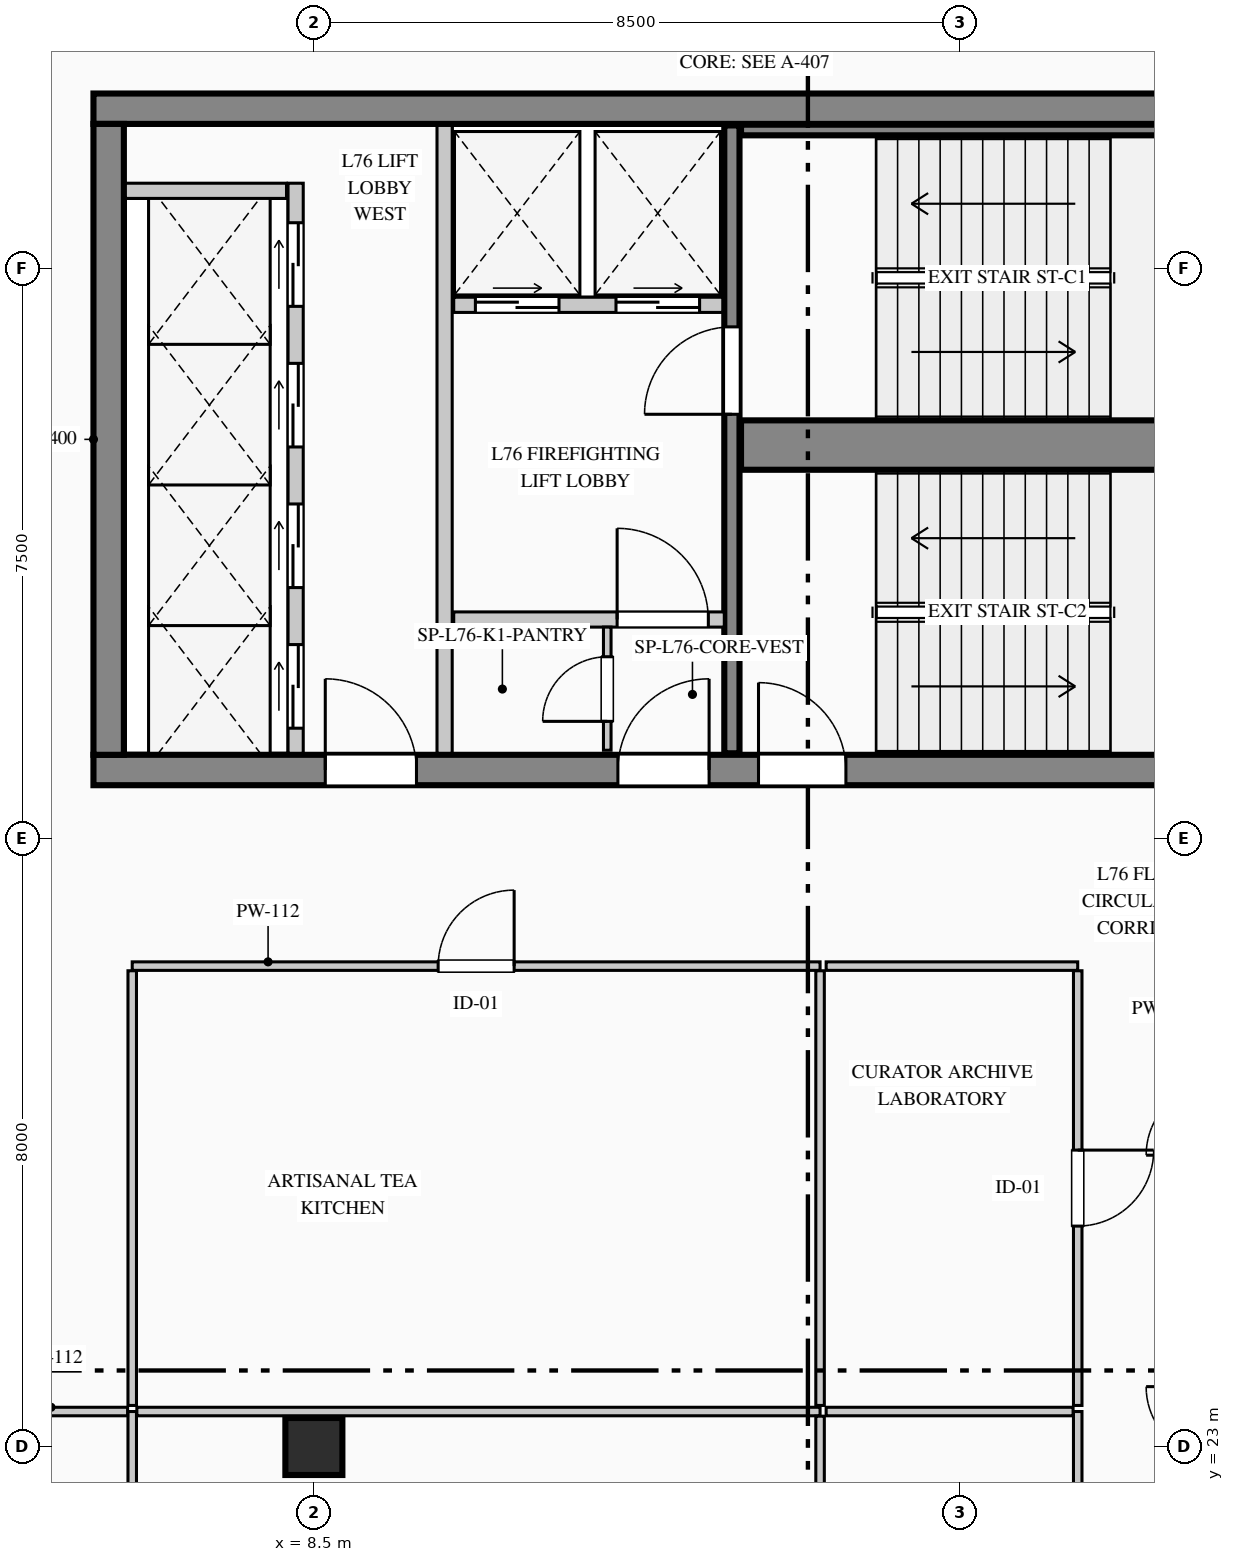
"""IFC4 building model, lengths in metres.
Left out: names, types, materials, properties, quantities, classifications, styles, units other than length and angle.
Written with IfcOpenShell. Run it as: python <this file> out.ifc"""

import sys

from ifc_helpers import new_model, si_unit, direction, frame, frame_2d, origin, origin_2d, place, context, subcontext, project, spatial, rectangle, extrude, element, fill, save


model = new_model("IFC4")
c1 = context("Model", 3, precision=1e-05, world=origin(), true_north=direction((0.0, 1.0)))
c2 = subcontext(c1, "Body", "Model", "MODEL_VIEW")
j1 = project(units=[si_unit("LENGTHUNIT", "METRE"), si_unit("PLANEANGLEUNIT", "RADIAN")], contexts=[c1])
p1 = place(None, origin())
s1 = spatial("IfcSite", under=j1, at=p1, CompositionType="ELEMENT")
p2 = place(p1, origin())
s2 = spatial("IfcBuilding", under=s1, at=p2, CompositionType="ELEMENT")
p3 = place(p2, frame((0.0, 0.0, 315.95)))
s3 = spatial("IfcBuildingStorey", under=s2, at=p3, CompositionType="ELEMENT", Elevation=315.95)
p4 = place(p3, frame((5.6, 40.6, 0.0), z_axis=(0.0, 0.0, 1.0), x_axis=(1.0, 0.0, 0.0)))
e1 = element("IfcWall", 1, at=p4, inside=s3, PredefinedType="SHEAR", context=c2, shape_type="SweptSolid", body=[
    extrude(rectangle(XDim=17.65, YDim=0.4, at=frame_2d((8.825, 0.0))), origin(), (0.0, 0.0, 1.0), 3.95),
])
p5 = place(p4, frame((15.845, 0.0, 0.0)))
e2 = element("IfcOpeningElement", 2, at=p5, cuts=e1, PredefinedType="OPENING", context=c2, shape_type="SweptSolid", body=[
    extrude(rectangle(XDim=1.18, YDim=2.25, at=frame_2d((0.59, 1.125))), frame((0.0, 0.21, 0.0), z_axis=(0.0, -1.0, 0.0), x_axis=(1.0, 0.0, 0.0)), (0.0, 0.0, 1.0), 0.42),
])
p6 = place(p3, frame((5.6, 31.9, 0.0), z_axis=(0.0, 0.0, 1.0), x_axis=(1.0, 0.0, 0.0)))
e3 = element("IfcWall", 3, at=p6, inside=s3, PredefinedType="SHEAR", context=c2, shape_type="SweptSolid", body=[
    extrude(rectangle(XDim=17.65, YDim=0.4, at=frame_2d((8.825, 0.0))), origin(), (0.0, 0.0, 1.0), 3.95),
])
p7 = place(p6, frame((3.05, 0.0, 0.0)))
e4 = element("IfcOpeningElement", 4, at=p7, cuts=e3, PredefinedType="OPENING", context=c2, shape_type="SweptSolid", body=[
    extrude(rectangle(XDim=1.2, YDim=2.2, at=frame_2d((0.6, 1.1))), frame((0.0, 0.21, 0.0), z_axis=(0.0, -1.0, 0.0), x_axis=(1.0, 0.0, 0.0)), (0.0, 0.0, 1.0), 0.42),
])
p8 = place(p6, frame((6.9, 0.0, 0.0)))
e5 = element("IfcOpeningElement", 5, at=p8, cuts=e3, PredefinedType="OPENING", context=c2, shape_type="SweptSolid", body=[
    extrude(rectangle(XDim=1.2, YDim=2.2, at=frame_2d((0.6, 1.1))), frame((0.0, 0.21, 0.0), z_axis=(0.0, -1.0, 0.0), x_axis=(1.0, 0.0, 0.0)), (0.0, 0.0, 1.0), 0.42),
])
p9 = place(p6, frame((8.75, 0.0, 0.0)))
e6 = element("IfcOpeningElement", 6, at=p9, cuts=e3, PredefinedType="OPENING", context=c2, shape_type="SweptSolid", body=[
    extrude(rectangle(XDim=1.15, YDim=2.2, at=frame_2d((0.575, 1.1))), frame((0.0, 0.21, 0.0), z_axis=(0.0, -1.0, 0.0), x_axis=(1.0, 0.0, 0.0)), (0.0, 0.0, 1.0), 0.42),
])
p10 = place(p6, frame((15.85, 0.0, 0.0)))
e7 = element("IfcOpeningElement", 7, at=p10, cuts=e3, PredefinedType="OPENING", context=c2, shape_type="SweptSolid", body=[
    extrude(rectangle(XDim=1.2, YDim=2.2, at=frame_2d((0.6, 1.1))), frame((0.0, 0.21, 0.0), z_axis=(0.0, -1.0, 0.0), x_axis=(1.0, 0.0, 0.0)), (0.0, 0.0, 1.0), 0.42),
])
p11 = place(p3, frame((5.8, 32.1, 0.0), z_axis=(0.0, 0.0, 1.0), x_axis=(0.0, 1.0, 0.0)))
e8 = element("IfcWall", 8, at=p11, inside=s3, PredefinedType="SHEAR", context=c2, shape_type="SweptSolid", body=[
    extrude(rectangle(XDim=8.3, YDim=0.4, at=frame_2d((4.15, 0.0))), origin(), (0.0, 0.0, 1.0), 3.95),
])
p12 = place(p3, frame((14.0, 32.12, 0.0), z_axis=(0.0, 0.0, 1.0), x_axis=(0.0, 1.0, 0.0)))
e9 = element("IfcWall", 9, at=p12, inside=s3, PredefinedType="SHEAR", context=c2, shape_type="SweptSolid", body=[
    extrude(rectangle(XDim=8.26, YDim=0.2, at=frame_2d((4.13, 0.0))), origin(), (0.0, 0.0, 1.0), 3.95),
])
p13 = place(p12, frame((4.46, 0.0, 0.0)))
e10 = element("IfcOpeningElement", 10, at=p13, cuts=e9, PredefinedType="OPENING", context=c2, shape_type="SweptSolid", body=[
    extrude(rectangle(XDim=1.15, YDim=2.2, at=frame_2d((0.575, 1.1))), frame((0.0, 0.11, 0.0), z_axis=(0.0, -1.0, 0.0), x_axis=(1.0, 0.0, 0.0)), (0.0, 0.0, 1.0), 0.22),
])
p14 = place(p3, frame((14.12, 36.175, 0.0), z_axis=(0.0, 0.0, 1.0), x_axis=(1.0, 0.0, 0.0)))
e11 = element("IfcWall", 11, at=p14, inside=s3, PredefinedType="SHEAR", context=c2, shape_type="SweptSolid", body=[
    extrude(rectangle(XDim=7.01, YDim=0.65, at=frame_2d((3.505, 0.0))), origin(), (0.0, 0.0, 1.0), 3.95),
])
p15 = place(p3, frame((14.12, 40.32, 0.0), z_axis=(0.0, 0.0, 1.0), x_axis=(1.0, 0.0, 0.0)))
e12 = element("IfcWall", 12, at=p15, inside=s3, PredefinedType="SHEAR", context=c2, shape_type="SweptSolid", body=[
    extrude(rectangle(XDim=7.01, YDim=0.14, at=frame_2d((3.505, 0.0))), origin(), (0.0, 0.0, 1.0), 3.95),
])
p16 = place(p3, frame((8.5, 23.0, 0.0), z_axis=(0.0, 0.0, 1.0), x_axis=(1.0, 0.0, 0.0)))
e13 = element("IfcColumn", 13, at=p16, inside=s3, PredefinedType="COLUMN", context=c2, shape_type="SweptSolid", body=[
    extrude(rectangle(XDim=0.75, YDim=0.75, at=origin_2d()), origin(), (0.0, 0.0, 1.0), 3.95),
])
p17 = place(p3, frame((8.26, 32.12, 0.0), z_axis=(0.0, 0.0, 1.0), x_axis=(0.0, 1.0, 0.0)))
e14 = element("IfcWall", 14, at=p17, inside=s3, PredefinedType="PARTITIONING", context=c2, shape_type="SweptSolid", body=[
    extrude(rectangle(XDim=7.5, YDim=0.2, at=frame_2d((3.75, 0.0))), origin(), (0.0, 0.0, 1.0), 3.7),
])
p18 = place(p17, frame((0.33, 0.0, 0.0)))
e15 = element("IfcOpeningElement", 15, at=p18, cuts=e14, PredefinedType="OPENING", context=c2, shape_type="SweptSolid", body=[
    extrude(rectangle(XDim=1.1, YDim=2.2, at=frame_2d((0.55, 1.1))), frame((0.0, 0.11, 0.0), z_axis=(0.0, -1.0, 0.0), x_axis=(1.0, 0.0, 0.0)), (0.0, 0.0, 1.0), 0.22),
])
p19 = place(p17, frame((2.18, 0.0, 0.0)))
e16 = element("IfcOpeningElement", 16, at=p19, cuts=e14, PredefinedType="OPENING", context=c2, shape_type="SweptSolid", body=[
    extrude(rectangle(XDim=1.1, YDim=2.2, at=frame_2d((0.55, 1.1))), frame((0.0, 0.11, 0.0), z_axis=(0.0, -1.0, 0.0), x_axis=(1.0, 0.0, 0.0)), (0.0, 0.0, 1.0), 0.22),
])
p20 = place(p17, frame((4.03, 0.0, 0.0)))
e17 = element("IfcOpeningElement", 17, at=p20, cuts=e14, PredefinedType="OPENING", context=c2, shape_type="SweptSolid", body=[
    extrude(rectangle(XDim=1.1, YDim=2.2, at=frame_2d((0.55, 1.1))), frame((0.0, 0.11, 0.0), z_axis=(0.0, -1.0, 0.0), x_axis=(1.0, 0.0, 0.0)), (0.0, 0.0, 1.0), 0.22),
])
p21 = place(p17, frame((5.88, 0.0, 0.0)))
e18 = element("IfcOpeningElement", 18, at=p21, cuts=e14, PredefinedType="OPENING", context=c2, shape_type="SweptSolid", body=[
    extrude(rectangle(XDim=1.1, YDim=2.2, at=frame_2d((0.55, 1.1))), frame((0.0, 0.11, 0.0), z_axis=(0.0, -1.0, 0.0), x_axis=(1.0, 0.0, 0.0)), (0.0, 0.0, 1.0), 0.22),
])
p22 = place(p3, frame((6.02, 39.52, 0.0), z_axis=(0.0, 0.0, 1.0), x_axis=(1.0, 0.0, 0.0)))
e19 = element("IfcWall", 19, at=p22, inside=s3, PredefinedType="PARTITIONING", context=c2, shape_type="SweptSolid", body=[
    extrude(rectangle(XDim=2.12, YDim=0.2, at=frame_2d((1.06, 0.0))), origin(), (0.0, 0.0, 1.0), 3.7),
])
p23 = place(p3, frame((10.22, 32.12, 0.0), z_axis=(0.0, 0.0, 1.0), x_axis=(0.0, 1.0, 0.0)))
e20 = element("IfcWall", 20, at=p23, inside=s3, PredefinedType="PARTITIONING", context=c2, shape_type="SweptSolid", body=[
    extrude(rectangle(XDim=8.26, YDim=0.2, at=frame_2d((4.13, 0.0))), origin(), (0.0, 0.0, 1.0), 3.7),
])
p24 = place(p3, frame((10.34, 38.02, 0.0), z_axis=(0.0, 0.0, 1.0), x_axis=(1.0, 0.0, 0.0)))
e21 = element("IfcWall", 21, at=p24, inside=s3, PredefinedType="PARTITIONING", context=c2, shape_type="SweptSolid", body=[
    extrude(rectangle(XDim=3.54, YDim=0.2, at=frame_2d((1.77, 0.0))), origin(), (0.0, 0.0, 1.0), 3.7),
])
p25 = place(p24, frame((0.285, 0.0, 0.0)))
e22 = element("IfcOpeningElement", 22, at=p25, cuts=e21, PredefinedType="OPENING", context=c2, shape_type="SweptSolid", body=[
    extrude(rectangle(XDim=1.1, YDim=2.2, at=frame_2d((0.55, 1.1))), frame((0.0, 0.11, 0.0), z_axis=(0.0, -1.0, 0.0), x_axis=(1.0, 0.0, 0.0)), (0.0, 0.0, 1.0), 0.22),
])
p26 = place(p24, frame((2.135, 0.0, 0.0)))
e23 = element("IfcOpeningElement", 23, at=p26, cuts=e21, PredefinedType="OPENING", context=c2, shape_type="SweptSolid", body=[
    extrude(rectangle(XDim=1.1, YDim=2.2, at=frame_2d((0.55, 1.1))), frame((0.0, 0.11, 0.0), z_axis=(0.0, -1.0, 0.0), x_axis=(1.0, 0.0, 0.0)), (0.0, 0.0, 1.0), 0.22),
])
p27 = place(p3, frame((10.34, 33.88, 0.0), z_axis=(0.0, 0.0, 1.0), x_axis=(1.0, 0.0, 0.0)))
e24 = element("IfcWall", 24, at=p27, inside=s3, PredefinedType="PARTITIONING", context=c2, shape_type="SweptSolid", body=[
    extrude(rectangle(XDim=3.56, YDim=0.2, at=frame_2d((1.78, 0.0))), origin(), (0.0, 0.0, 1.0), 3.7),
])
p28 = place(p27, frame((2.15, 0.0, 0.0)))
e25 = element("IfcOpeningElement", 25, at=p28, cuts=e24, PredefinedType="OPENING", context=c2, shape_type="SweptSolid", body=[
    extrude(rectangle(XDim=1.2, YDim=2.2, at=frame_2d((0.6, 1.1))), frame((0.0, 0.11, 0.0), z_axis=(0.0, -1.0, 0.0), x_axis=(1.0, 0.0, 0.0)), (0.0, 0.0, 1.0), 0.22),
])
p29 = place(p3, frame((12.36, 32.16, 0.0), z_axis=(0.0, 0.0, 1.0), x_axis=(0.0, 1.0, 0.0)))
e26 = element("IfcWall", 26, at=p29, inside=s3, PredefinedType="PARTITIONING", context=c2, shape_type="SweptSolid", body=[
    extrude(rectangle(XDim=1.62, YDim=0.1, at=frame_2d((0.81, 0.0))), origin(), (0.0, 0.0, 1.0), 3.7),
])
p30 = place(p29, frame((0.38, 0.0, 0.0)))
e27 = element("IfcOpeningElement", 27, at=p30, cuts=e26, PredefinedType="OPENING", context=c2, shape_type="SweptSolid", body=[
    extrude(rectangle(XDim=0.85, YDim=2.1, at=frame_2d((0.425, 1.05))), frame((0.0, 0.06, 0.0), z_axis=(0.0, -1.0, 0.0), x_axis=(1.0, 0.0, 0.0)), (0.0, 0.0, 1.0), 0.12),
])
p31 = place(p3, frame((6.11, 18.941, 0.0), z_axis=(0.0, 0.0, 1.0), x_axis=(0.0, 1.0, 0.0)))
e28 = element("IfcWall", 28, at=p31, inside=s3, PredefinedType="PARTITIONING", context=c2, shape_type="SweptSolid", body=[
    extrude(rectangle(XDim=4.519, YDim=0.112, at=frame_2d((2.26, 0.0))), origin(), (0.0, 0.0, 1.0), 3.7),
])
p32 = place(p3, frame((4.034, 23.46, 0.0), z_axis=(0.0, 0.0, 1.0), x_axis=(1.0, 0.0, 0.0)))
e29 = element("IfcWall", 29, at=p32, inside=s3, PredefinedType="PARTITIONING", context=c2, shape_type="SweptSolid", body=[
    extrude(rectangle(XDim=2.015, YDim=0.112, at=frame_2d((1.007, 0.0))), origin(), (0.0, 0.0, 1.0), 3.7),
])
p33 = place(p3, frame((6.171, 23.46, 0.0), z_axis=(0.0, 0.0, 1.0), x_axis=(1.0, 0.0, 0.0)))
e30 = element("IfcWall", 30, at=p33, inside=s3, PredefinedType="PARTITIONING", context=c2, shape_type="SweptSolid", body=[
    extrude(rectangle(XDim=8.989, YDim=0.112, at=frame_2d((4.495, 0.0))), origin(), (0.0, 0.0, 1.0), 3.7),
])
p34 = place(p3, frame((15.16, 23.399, 0.0), z_axis=(0.0, 0.0, 1.0), x_axis=(0.0, -1.0, 0.0)))
e31 = element("IfcWall", 31, at=p34, inside=s3, PredefinedType="PARTITIONING", context=c2, shape_type="SweptSolid", body=[
    extrude(rectangle(XDim=4.458, YDim=0.112, at=frame_2d((2.229, 0.0))), origin(), (0.0, 0.0, 1.0), 3.7),
])
p35 = place(p3, frame((18.55, 23.46, 0.0), z_axis=(0.0, 0.0, 1.0), x_axis=(0.0, -1.0, 0.0)))
e32 = element("IfcWall", 32, at=p35, inside=s3, PredefinedType="PARTITIONING", context=c2, shape_type="SweptSolid", body=[
    extrude(rectangle(XDim=4.58, YDim=0.112, at=frame_2d((2.29, 0.0))), origin(), (0.0, 0.0, 1.0), 3.7),
])
p36 = place(p35, frame((1.79, 0.0, 0.0)))
e33 = element("IfcOpeningElement", 33, at=p36, cuts=e32, PredefinedType="OPENING", context=c2, shape_type="SweptSolid", body=[
    extrude(rectangle(XDim=1.0, YDim=2.15, at=frame_2d((0.5, 1.075))), frame((0.0, 0.066, 0.0), z_axis=(0.0, -1.0, 0.0), x_axis=(1.0, 0.0, 0.0)), (0.0, 0.0, 1.0), 0.132),
])
p37 = place(p3, frame((15.24, 23.46, 0.0), z_axis=(0.0, 0.0, 1.0), x_axis=(1.0, 0.0, 0.0)))
e34 = element("IfcWall", 34, at=p37, inside=s3, PredefinedType="PARTITIONING", context=c2, shape_type="SweptSolid", body=[
    extrude(rectangle(XDim=3.249, YDim=0.112, at=frame_2d((1.625, 0.0))), origin(), (0.0, 0.0, 1.0), 3.7),
])
p38 = place(p3, frame((6.11, 29.32, 0.0), z_axis=(0.0, 0.0, 1.0), x_axis=(1.0, 0.0, 0.0)))
e35 = element("IfcWall", 35, at=p38, inside=s3, PredefinedType="PARTITIONING", context=c2, shape_type="SweptSolid", body=[
    extrude(rectangle(XDim=9.05, YDim=0.112, at=frame_2d((4.525, 0.0))), origin(), (0.0, 0.0, 1.0), 3.7),
])
p39 = place(p38, frame((4.025, 0.0, 0.0)))
e36 = element("IfcOpeningElement", 36, at=p39, cuts=e35, PredefinedType="OPENING", context=c2, shape_type="SweptSolid", body=[
    extrude(rectangle(XDim=1.0, YDim=2.15, at=frame_2d((0.5, 1.075))), frame((0.0, 0.066, 0.0), z_axis=(0.0, -1.0, 0.0), x_axis=(1.0, 0.0, 0.0)), (0.0, 0.0, 1.0), 0.132),
])
for number, where, z_axis, x_axis in (
    (37, (15.16, 29.259, 0.0), (0.0, 0.0, 1.0), (0.0, -1.0, 0.0)),
    (38, (6.11, 23.54, 0.0), (0.0, 0.0, 1.0), (0.0, 1.0, 0.0)),
):
    element("IfcWall", number, at=place(p3, frame(where, z_axis=z_axis, x_axis=x_axis)), inside=s3, PredefinedType="PARTITIONING", context=c2, shape_type="SweptSolid", body=[
        extrude(rectangle(XDim=5.719, YDim=0.112, at=frame_2d((2.859, 0.0))), origin(), (0.0, 0.0, 1.0), 3.7),
    ])
p40 = place(p3, frame((15.24, 29.32, 0.0), z_axis=(0.0, 0.0, 1.0), x_axis=(1.0, 0.0, 0.0)))
e39 = element("IfcWall", 39, at=p40, inside=s3, PredefinedType="PARTITIONING", context=c2, shape_type="SweptSolid", body=[
    extrude(rectangle(XDim=3.31, YDim=0.112, at=frame_2d((1.655, 0.0))), origin(), (0.0, 0.0, 1.0), 3.7),
])
p41 = place(p3, frame((18.55, 29.259, 0.0), z_axis=(0.0, 0.0, 1.0), x_axis=(0.0, -1.0, 0.0)))
e40 = element("IfcWall", 40, at=p41, inside=s3, PredefinedType="PARTITIONING", context=c2, shape_type="SweptSolid", body=[
    extrude(rectangle(XDim=5.719, YDim=0.112, at=frame_2d((2.859, 0.0))), origin(), (0.0, 0.0, 1.0), 3.7),
])
p42 = place(p41, frame((2.36, 0.0, 0.0)))
e41 = element("IfcOpeningElement", 41, at=p42, cuts=e40, PredefinedType="OPENING", context=c2, shape_type="SweptSolid", body=[
    extrude(rectangle(XDim=1.0, YDim=2.15, at=frame_2d((0.5, 1.075))), frame((0.0, 0.066, 0.0), z_axis=(0.0, -1.0, 0.0), x_axis=(1.0, 0.0, 0.0)), (0.0, 0.0, 1.0), 0.132),
])
p43 = place(p7, origin())
e42 = element("IfcDoor", 42, at=p43, inside=s3, OperationType="SINGLE_SWING_LEFT", PredefinedType="DOOR", context=c2, shape_type="SweptSolid", body=[
    extrude(rectangle(XDim=1.2, YDim=2.2, at=frame_2d((0.6, 1.1))), frame((0.0, 0.025, 0.0), z_axis=(0.0, -1.0, 0.0), x_axis=(1.0, 0.0, 0.0)), (0.0, 0.0, 1.0), 0.05),
])
fill(e4, e42)
p44 = place(p8, origin())
e43 = element("IfcDoor", 43, at=p44, inside=s3, OperationType="SINGLE_SWING_RIGHT", PredefinedType="DOOR", context=c2, shape_type="SweptSolid", body=[
    extrude(rectangle(XDim=1.2, YDim=2.2, at=frame_2d((0.6, 1.1))), frame((0.0, 0.025, 0.0), z_axis=(0.0, -1.0, 0.0), x_axis=(1.0, 0.0, 0.0)), (0.0, 0.0, 1.0), 0.05),
])
fill(e5, e43)
p45 = place(p9, origin())
e44 = element("IfcDoor", 44, at=p45, inside=s3, OperationType="SINGLE_SWING_LEFT", PredefinedType="DOOR", context=c2, shape_type="SweptSolid", body=[
    extrude(rectangle(XDim=1.15, YDim=2.2, at=frame_2d((0.575, 1.1))), frame((0.0, 0.025, 0.0), z_axis=(0.0, -1.0, 0.0), x_axis=(1.0, 0.0, 0.0)), (0.0, 0.0, 1.0), 0.05),
])
fill(e6, e44)
p46 = place(p28, origin())
e45 = element("IfcDoor", 45, at=p46, inside=s3, OperationType="SINGLE_SWING_LEFT", PredefinedType="DOOR", context=c2, shape_type="SweptSolid", body=[
    extrude(rectangle(XDim=1.2, YDim=2.2, at=frame_2d((0.6, 1.1))), frame((0.0, 0.025, 0.0), z_axis=(0.0, -1.0, 0.0), x_axis=(1.0, 0.0, 0.0)), (0.0, 0.0, 1.0), 0.05),
])
fill(e25, e45)
p47 = place(p30, origin())
e46 = element("IfcDoor", 46, at=p47, inside=s3, OperationType="SINGLE_SWING_LEFT", PredefinedType="DOOR", context=c2, shape_type="SweptSolid", body=[
    extrude(rectangle(XDim=0.85, YDim=2.1, at=frame_2d((0.425, 1.05))), frame((0.0, 0.025, 0.0), z_axis=(0.0, -1.0, 0.0), x_axis=(1.0, 0.0, 0.0)), (0.0, 0.0, 1.0), 0.05),
])
fill(e27, e46)
p48 = place(p13, origin())
e47 = element("IfcDoor", 47, at=p48, inside=s3, OperationType="SINGLE_SWING_LEFT", PredefinedType="DOOR", context=c2, shape_type="SweptSolid", body=[
    extrude(rectangle(XDim=1.15, YDim=2.2, at=frame_2d((0.575, 1.1))), frame((0.0, 0.025, 0.0), z_axis=(0.0, -1.0, 0.0), x_axis=(1.0, 0.0, 0.0)), (0.0, 0.0, 1.0), 0.05),
])
fill(e10, e47)
p49 = place(p18, origin())
e48 = element("IfcDoor", 48, at=p49, inside=s3, OperationType="DOUBLE_DOOR_SLIDING", PredefinedType="DOOR", context=c2, shape_type="SweptSolid", body=[
    extrude(rectangle(XDim=1.1, YDim=2.2, at=frame_2d((0.55, 1.1))), frame((0.0, 0.025, 0.0), z_axis=(0.0, -1.0, 0.0), x_axis=(1.0, 0.0, 0.0)), (0.0, 0.0, 1.0), 0.05),
])
fill(e15, e48)
p50 = place(p19, origin())
e49 = element("IfcDoor", 49, at=p50, inside=s3, OperationType="DOUBLE_DOOR_SLIDING", PredefinedType="DOOR", context=c2, shape_type="SweptSolid", body=[
    extrude(rectangle(XDim=1.1, YDim=2.2, at=frame_2d((0.55, 1.1))), frame((0.0, 0.025, 0.0), z_axis=(0.0, -1.0, 0.0), x_axis=(1.0, 0.0, 0.0)), (0.0, 0.0, 1.0), 0.05),
])
fill(e16, e49)
p51 = place(p20, origin())
e50 = element("IfcDoor", 50, at=p51, inside=s3, OperationType="DOUBLE_DOOR_SLIDING", PredefinedType="DOOR", context=c2, shape_type="SweptSolid", body=[
    extrude(rectangle(XDim=1.1, YDim=2.2, at=frame_2d((0.55, 1.1))), frame((0.0, 0.025, 0.0), z_axis=(0.0, -1.0, 0.0), x_axis=(1.0, 0.0, 0.0)), (0.0, 0.0, 1.0), 0.05),
])
fill(e17, e50)
p52 = place(p21, origin())
e51 = element("IfcDoor", 51, at=p52, inside=s3, OperationType="DOUBLE_DOOR_SLIDING", PredefinedType="DOOR", context=c2, shape_type="SweptSolid", body=[
    extrude(rectangle(XDim=1.1, YDim=2.2, at=frame_2d((0.55, 1.1))), frame((0.0, 0.025, 0.0), z_axis=(0.0, -1.0, 0.0), x_axis=(1.0, 0.0, 0.0)), (0.0, 0.0, 1.0), 0.05),
])
fill(e18, e51)
p53 = place(p25, origin())
e52 = element("IfcDoor", 52, at=p53, inside=s3, OperationType="DOUBLE_DOOR_SLIDING", PredefinedType="DOOR", context=c2, shape_type="SweptSolid", body=[
    extrude(rectangle(XDim=1.1, YDim=2.2, at=frame_2d((0.55, 1.1))), frame((0.0, 0.025, 0.0), z_axis=(0.0, -1.0, 0.0), x_axis=(1.0, 0.0, 0.0)), (0.0, 0.0, 1.0), 0.05),
])
fill(e22, e52)
p54 = place(p26, origin())
e53 = element("IfcDoor", 53, at=p54, inside=s3, OperationType="DOUBLE_DOOR_SLIDING", PredefinedType="DOOR", context=c2, shape_type="SweptSolid", body=[
    extrude(rectangle(XDim=1.1, YDim=2.2, at=frame_2d((0.55, 1.1))), frame((0.0, 0.025, 0.0), z_axis=(0.0, -1.0, 0.0), x_axis=(1.0, 0.0, 0.0)), (0.0, 0.0, 1.0), 0.05),
])
fill(e23, e53)
p55 = place(p39, origin())
e54 = element("IfcDoor", 54, at=p55, inside=s3, OperationType="SINGLE_SWING_RIGHT", PredefinedType="DOOR", context=c2, shape_type="SweptSolid", body=[
    extrude(rectangle(XDim=1.0, YDim=2.15, at=frame_2d((0.5, 1.075))), frame((0.0, 0.025, 0.0), z_axis=(0.0, -1.0, 0.0), x_axis=(1.0, 0.0, 0.0)), (0.0, 0.0, 1.0), 0.05),
])
fill(e36, e54)
p56 = place(p42, origin())
e55 = element("IfcDoor", 55, at=p56, inside=s3, OperationType="SINGLE_SWING_LEFT", PredefinedType="DOOR", context=c2, shape_type="SweptSolid", body=[
    extrude(rectangle(XDim=1.0, YDim=2.15, at=frame_2d((0.5, 1.075))), frame((0.0, 0.025, 0.0), z_axis=(0.0, -1.0, 0.0), x_axis=(1.0, 0.0, 0.0)), (0.0, 0.0, 1.0), 0.05),
])
fill(e41, e55)
save(model, sys.argv[1])
